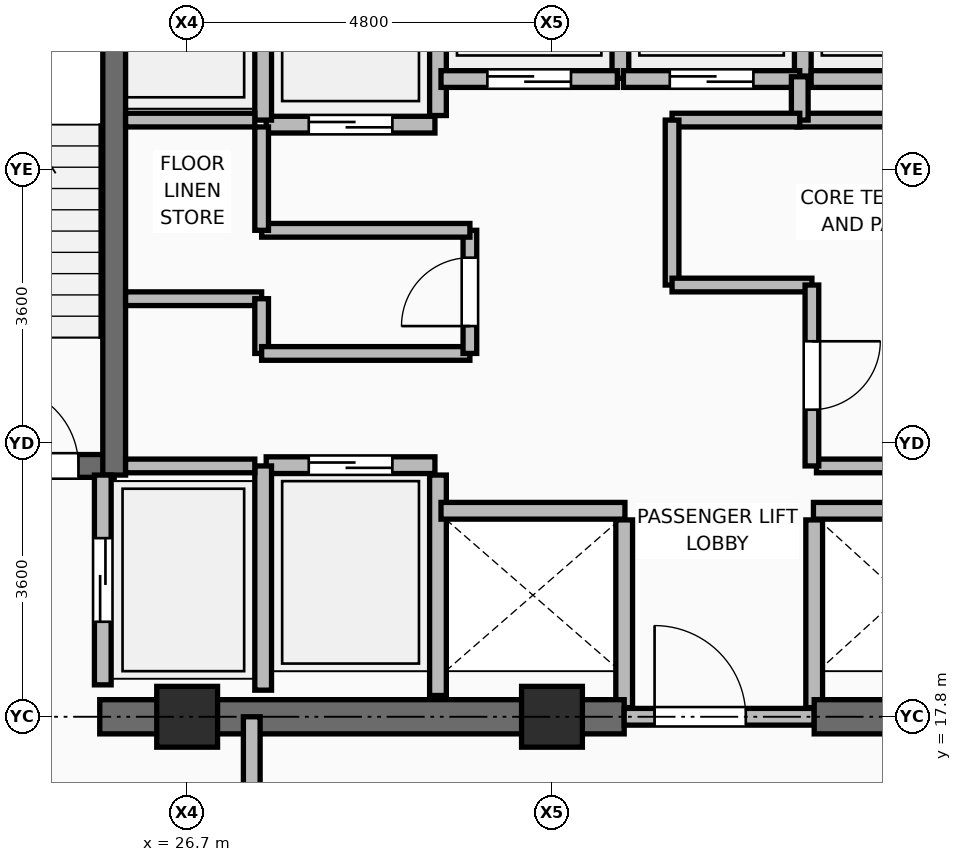
"""IFC4 building model, lengths in metres.
Left out: names, types, materials, properties, quantities, classifications, styles, units other than length and angle.
Written with IfcOpenShell. Run it as: python <this file> out.ifc"""

import sys

from ifc_helpers import new_model, si_unit, direction, frame, frame_2d, origin, origin_2d, place, context, subcontext, project, spatial, rectangle, extrude, element, fill, save


model = new_model("IFC4")
c1 = context("Model", 3, precision=1e-05, world=origin(), true_north=direction((0.0, 1.0)))
c2 = subcontext(c1, "Body", "Model", "MODEL_VIEW")
j1 = project(units=[si_unit("LENGTHUNIT", "METRE"), si_unit("PLANEANGLEUNIT", "RADIAN")], contexts=[c1])
p1 = place(None, origin())
s1 = spatial("IfcSite", under=j1, at=p1, CompositionType="ELEMENT")
p2 = place(p1, origin())
s2 = spatial("IfcBuilding", under=s1, at=p2, CompositionType="ELEMENT")
p3 = place(p2, frame((0.0, 0.0, 216.15)))
s3 = spatial("IfcBuildingStorey", under=s2, at=p3, CompositionType="ELEMENT", Elevation=216.15)
for number, where, z_axis, x_axis in (
    (1, (26.7, 17.8, 0.0), (0.0, 0.0, 1.0), (1.0, 0.0, 0.0)),
    (2, (31.5, 17.8, 0.0), (0.0, 0.0, 1.0), (1.0, 0.0, 0.0)),
):
    element("IfcColumn", number, at=place(p3, frame(where, z_axis=z_axis, x_axis=x_axis)), inside=s3, PredefinedType="COLUMN", context=c2, shape_type="SweptSolid", body=[
        extrude(rectangle(XDim=0.8, YDim=0.8, at=origin_2d()), origin(), (0.0, 0.0, 1.0), 3.75),
    ])
p4 = place(p3, frame((30.0, 18.08, 0.0), z_axis=(0.0, 0.0, 1.0), x_axis=(0.0, 1.0, 0.0)))
e3 = element("IfcWall", 3, at=p4, inside=s3, PredefinedType="PARTITIONING", context=c2, shape_type="SweptSolid", body=[
    extrude(rectangle(XDim=2.9, YDim=0.22, at=frame_2d((1.45, 0.0))), origin(), (0.0, 0.0, 1.0), 3.545),
])
for number, where, z_axis, x_axis in (
    (4, (32.45, 17.92, 0.0), (0.0, 0.0, 1.0), (0.0, 1.0, 0.0)),
    (5, (34.95, 17.92, 0.0), (0.0, 0.0, 1.0), (0.0, 1.0, 0.0)),
):
    element("IfcWall", number, at=place(p3, frame(where, z_axis=z_axis, x_axis=x_axis)), inside=s3, PredefinedType="PARTITIONING", context=c2, shape_type="SweptSolid", body=[
        extrude(rectangle(XDim=2.47, YDim=0.22, at=frame_2d((1.235, 0.0))), origin(), (0.0, 0.0, 1.0), 3.545),
    ])
p5 = place(p3, frame((30.0, 25.71, 0.0), z_axis=(0.0, 0.0, 1.0), x_axis=(0.0, 1.0, 0.0)))
e6 = element("IfcWall", 6, at=p5, inside=s3, PredefinedType="PARTITIONING", context=c2, shape_type="SweptSolid", body=[
    extrude(rectangle(XDim=2.73, YDim=0.22, at=frame_2d((1.365, 0.0))), origin(), (0.0, 0.0, 1.0), 3.545),
])
p6 = place(p3, frame((32.4, 26.2, 0.0), z_axis=(0.0, 0.0, 1.0), x_axis=(0.0, 1.0, 0.0)))
e7 = element("IfcWall", 7, at=p6, inside=s3, PredefinedType="PARTITIONING", context=c2, shape_type="SweptSolid", body=[
    extrude(rectangle(XDim=2.24, YDim=0.22, at=frame_2d((1.12, 0.0))), origin(), (0.0, 0.0, 1.0), 3.545),
])
p7 = place(p3, frame((34.8, 26.23, 0.0), z_axis=(0.0, 0.0, 1.0), x_axis=(0.0, 1.0, 0.0)))
e8 = element("IfcWall", 8, at=p7, inside=s3, PredefinedType="PARTITIONING", context=c2, shape_type="SweptSolid", body=[
    extrude(rectangle(XDim=2.21, YDim=0.22, at=frame_2d((1.105, 0.0))), origin(), (0.0, 0.0, 1.0), 3.545),
])
p8 = place(p3, frame((34.91, 26.19, 0.0), z_axis=(0.0, 0.0, 1.0), x_axis=(1.0, 0.0, 0.0)))
e9 = element("IfcWall", 9, at=p8, inside=s3, PredefinedType="PARTITIONING", context=c2, shape_type="SweptSolid", body=[
    extrude(rectangle(XDim=2.14, YDim=0.22, at=frame_2d((1.07, 0.0))), origin(), (0.0, 0.0, 1.0), 3.545),
])
p9 = place(p3, frame((25.55, 17.8, 0.0), z_axis=(0.0, 0.0, 1.0), x_axis=(1.0, 0.0, 0.0)))
e10 = element("IfcWall", 10, at=p9, inside=s3, PredefinedType="SHEAR", context=c2, shape_type="SweptSolid", body=[
    extrude(rectangle(XDim=6.9, YDim=0.45, at=frame_2d((3.45, 0.0))), origin(), (0.0, 0.0, 1.0), 3.57),
])
p10 = place(p3, frame((32.45, 17.8, 0.0), z_axis=(0.0, 0.0, 1.0), x_axis=(1.0, 0.0, 0.0)))
e11 = element("IfcWall", 11, at=p10, inside=s3, PredefinedType="PARTITIONING", context=c2, shape_type="SweptSolid", body=[
    extrude(rectangle(XDim=2.5, YDim=0.22, at=frame_2d((1.25, 0.0))), origin(), (0.0, 0.0, 1.0), 3.081),
])
p11 = place(p10, frame((0.4, 0.0, 0.0)))
e12 = element("IfcOpeningElement", 12, at=p11, cuts=e11, PredefinedType="OPENING", context=c2, shape_type="SweptSolid", body=[
    extrude(rectangle(XDim=1.2, YDim=2.1, at=frame_2d((0.6, 1.05))), frame((0.0, 0.12, 0.0), z_axis=(0.0, -1.0, 0.0), x_axis=(1.0, 0.0, 0.0)), (0.0, 0.0, 1.0), 0.24),
])
p12 = place(p3, frame((34.95, 17.8, 0.0), z_axis=(0.0, 0.0, 1.0), x_axis=(1.0, 0.0, 0.0)))
e13 = element("IfcWall", 13, at=p12, inside=s3, PredefinedType="SHEAR", context=c2, shape_type="SweptSolid", body=[
    extrude(rectangle(XDim=6.375, YDim=0.45, at=frame_2d((3.188, 0.0))), origin(), (0.0, 0.0, 1.0), 3.57),
])
p13 = place(p3, frame((22.125, 21.1, 0.0), z_axis=(0.0, 0.0, 1.0), x_axis=(1.0, 0.0, 0.0)))
e14 = element("IfcWall", 14, at=p13, inside=s3, PredefinedType="SHEAR", context=c2, shape_type="SweptSolid", body=[
    extrude(rectangle(XDim=3.615, YDim=0.3, at=frame_2d((1.808, 0.0))), origin(), (0.0, 0.0, 1.0), 3.57),
])
p14 = place(p13, frame((2.095, 0.0, 0.0)))
e15 = element("IfcOpeningElement", 15, at=p14, cuts=e14, PredefinedType="OPENING", context=c2, shape_type="SweptSolid", body=[
    extrude(rectangle(XDim=1.05, YDim=2.1, at=frame_2d((0.525, 1.05))), frame((0.0, 0.16, 0.0), z_axis=(0.0, -1.0, 0.0), x_axis=(1.0, 0.0, 0.0)), (0.0, 0.0, 1.0), 0.32),
])
p15 = place(p3, frame((25.74, 20.98, 0.0), z_axis=(0.0, 0.0, 1.0), x_axis=(0.0, 1.0, 0.0)))
e16 = element("IfcWall", 16, at=p15, inside=s3, PredefinedType="SHEAR", context=c2, shape_type="SweptSolid", body=[
    extrude(rectangle(XDim=7.99, YDim=0.3, at=frame_2d((3.995, 0.0))), origin(), (0.0, 0.0, 1.0), 3.57),
])
p16 = place(p3, frame((25.59, 18.22, 0.0), z_axis=(0.0, 0.0, 1.0), x_axis=(0.0, 1.0, 0.0)))
e17 = element("IfcWall", 17, at=p16, inside=s3, PredefinedType="PARTITIONING", context=c2, shape_type="SweptSolid", body=[
    extrude(rectangle(XDim=2.76, YDim=0.22, at=frame_2d((1.38, 0.0))), origin(), (0.0, 0.0, 1.0), 3.55),
])
p17 = place(p16, frame((0.83, 0.0, 0.0)))
e18 = element("IfcOpeningElement", 18, at=p17, cuts=e17, PredefinedType="OPENING", context=c2, shape_type="SweptSolid", body=[
    extrude(rectangle(XDim=1.1, YDim=2.2, at=frame_2d((0.55, 1.1))), frame((0.0, 0.12, 0.0), z_axis=(0.0, -1.0, 0.0), x_axis=(1.0, 0.0, 0.0)), (0.0, 0.0, 1.0), 0.24),
])
p18 = place(p3, frame((27.74, 21.11, 0.0), z_axis=(0.0, 0.0, 1.0), x_axis=(1.0, 0.0, 0.0)))
e19 = element("IfcWall", 19, at=p18, inside=s3, PredefinedType="PARTITIONING", context=c2, shape_type="SweptSolid", body=[
    extrude(rectangle(XDim=2.22, YDim=0.22, at=frame_2d((1.11, 0.0))), origin(), (0.0, 0.0, 1.0), 3.55),
])
p19 = place(p18, frame((0.56, 0.0, 0.0)))
e20 = element("IfcOpeningElement", 20, at=p19, cuts=e19, PredefinedType="OPENING", context=c2, shape_type="SweptSolid", body=[
    extrude(rectangle(XDim=1.1, YDim=2.2, at=frame_2d((0.55, 1.1))), frame((0.0, 0.12, 0.0), z_axis=(0.0, -1.0, 0.0), x_axis=(1.0, 0.0, 0.0)), (0.0, 0.0, 1.0), 0.24),
])
p20 = place(p3, frame((27.74, 25.59, 0.0), z_axis=(0.0, 0.0, 1.0), x_axis=(1.0, 0.0, 0.0)))
e21 = element("IfcWall", 21, at=p20, inside=s3, PredefinedType="PARTITIONING", context=c2, shape_type="SweptSolid", body=[
    extrude(rectangle(XDim=2.22, YDim=0.22, at=frame_2d((1.11, 0.0))), origin(), (0.0, 0.0, 1.0), 3.55),
])
p21 = place(p20, frame((0.56, 0.0, 0.0)))
e22 = element("IfcOpeningElement", 22, at=p21, cuts=e21, PredefinedType="OPENING", context=c2, shape_type="SweptSolid", body=[
    extrude(rectangle(XDim=1.1, YDim=2.2, at=frame_2d((0.55, 1.1))), frame((0.0, 0.12, 0.0), z_axis=(0.0, -1.0, 0.0), x_axis=(1.0, 0.0, 0.0)), (0.0, 0.0, 1.0), 0.24),
])
p22 = place(p3, frame((30.04, 20.51, 0.0), z_axis=(0.0, 0.0, 1.0), x_axis=(1.0, 0.0, 0.0)))
e23 = element("IfcWall", 23, at=p22, inside=s3, PredefinedType="PARTITIONING", context=c2, shape_type="SweptSolid", body=[
    extrude(rectangle(XDim=2.42, YDim=0.22, at=frame_2d((1.21, 0.0))), origin(), (0.0, 0.0, 1.0), 3.55),
])
p23 = place(p3, frame((34.94, 20.51, 0.0), z_axis=(0.0, 0.0, 1.0), x_axis=(1.0, 0.0, 0.0)))
e24 = element("IfcWall", 24, at=p23, inside=s3, PredefinedType="PARTITIONING", context=c2, shape_type="SweptSolid", body=[
    extrude(rectangle(XDim=2.24, YDim=0.22, at=frame_2d((1.12, 0.0))), origin(), (0.0, 0.0, 1.0), 3.55),
])
p24 = place(p3, frame((30.04, 26.19, 0.0), z_axis=(0.0, 0.0, 1.0), x_axis=(1.0, 0.0, 0.0)))
e25 = element("IfcWall", 25, at=p24, inside=s3, PredefinedType="PARTITIONING", context=c2, shape_type="SweptSolid", body=[
    extrude(rectangle(XDim=2.32, YDim=0.22, at=frame_2d((1.16, 0.0))), origin(), (0.0, 0.0, 1.0), 3.55),
])
p25 = place(p24, frame((0.61, 0.0, 0.0)))
e26 = element("IfcOpeningElement", 26, at=p25, cuts=e25, PredefinedType="OPENING", context=c2, shape_type="SweptSolid", body=[
    extrude(rectangle(XDim=1.1, YDim=2.2, at=frame_2d((0.55, 1.1))), frame((0.0, 0.12, 0.0), z_axis=(0.0, -1.0, 0.0), x_axis=(1.0, 0.0, 0.0)), (0.0, 0.0, 1.0), 0.24),
])
p26 = place(p3, frame((32.44, 26.19, 0.0), z_axis=(0.0, 0.0, 1.0), x_axis=(1.0, 0.0, 0.0)))
e27 = element("IfcWall", 27, at=p26, inside=s3, PredefinedType="PARTITIONING", context=c2, shape_type="SweptSolid", body=[
    extrude(rectangle(XDim=2.32, YDim=0.22, at=frame_2d((1.16, 0.0))), origin(), (0.0, 0.0, 1.0), 3.55),
])
p27 = place(p26, frame((0.61, 0.0, 0.0)))
e28 = element("IfcOpeningElement", 28, at=p27, cuts=e27, PredefinedType="OPENING", context=c2, shape_type="SweptSolid", body=[
    extrude(rectangle(XDim=1.1, YDim=2.2, at=frame_2d((0.55, 1.1))), frame((0.0, 0.12, 0.0), z_axis=(0.0, -1.0, 0.0), x_axis=(1.0, 0.0, 0.0)), (0.0, 0.0, 1.0), 0.24),
])
p28 = place(p3, frame((27.7, 18.15, 0.0), z_axis=(0.0, 0.0, 1.0), x_axis=(0.0, 1.0, 0.0)))
e29 = element("IfcWall", 29, at=p28, inside=s3, PredefinedType="PARTITIONING", context=c2, shape_type="SweptSolid", body=[
    extrude(rectangle(XDim=2.95, YDim=0.22, at=frame_2d((1.475, 0.0))), origin(), (0.0, 0.0, 1.0), 3.55),
])
p29 = place(p3, frame((27.7, 25.65, 0.0), z_axis=(0.0, 0.0, 1.0), x_axis=(0.0, 1.0, 0.0)))
e30 = element("IfcWall", 30, at=p29, inside=s3, PredefinedType="PARTITIONING", context=c2, shape_type="SweptSolid", body=[
    extrude(rectangle(XDim=3.0, YDim=0.22, at=frame_2d((1.5, 0.0))), origin(), (0.0, 0.0, 1.0), 3.55),
])
for number, where, z_axis, x_axis in (
    (31, (25.89, 21.1, 0.0), (0.0, 0.0, 1.0), (1.0, 0.0, 0.0)),
    (32, (25.89, 25.65, 0.0), (0.0, 0.0, 1.0), (1.0, 0.0, 0.0)),
):
    element("IfcWall", number, at=place(p3, frame(where, z_axis=z_axis, x_axis=x_axis)), inside=s3, PredefinedType="PARTITIONING", context=c2, shape_type="SweptSolid", body=[
        extrude(rectangle(XDim=1.7, YDim=0.18, at=frame_2d((0.85, 0.0))), origin(), (0.0, 0.0, 1.0), 3.55),
    ])
p30 = place(p3, frame((25.89, 23.3, 0.0), z_axis=(0.0, 0.0, 1.0), x_axis=(1.0, 0.0, 0.0)))
e33 = element("IfcWall", 33, at=p30, inside=s3, PredefinedType="PARTITIONING", context=c2, shape_type="SweptSolid", body=[
    extrude(rectangle(XDim=1.79, YDim=0.18, at=frame_2d((0.895, 0.0))), origin(), (0.0, 0.0, 1.0), 3.55),
])
p31 = place(p3, frame((27.68, 22.58, 0.0), z_axis=(0.0, 0.0, 1.0), x_axis=(0.0, 1.0, 0.0)))
e34 = element("IfcWall", 34, at=p31, inside=s3, PredefinedType="PARTITIONING", context=c2, shape_type="SweptSolid", body=[
    extrude(rectangle(XDim=0.72, YDim=0.18, at=frame_2d((0.36, 0.0))), origin(), (0.0, 0.0, 1.0), 3.55),
])
p32 = place(p3, frame((27.68, 22.58, 0.0), z_axis=(0.0, 0.0, 1.0), x_axis=(1.0, 0.0, 0.0)))
e35 = element("IfcWall", 35, at=p32, inside=s3, PredefinedType="PARTITIONING", context=c2, shape_type="SweptSolid", body=[
    extrude(rectangle(XDim=2.74, YDim=0.18, at=frame_2d((1.37, 0.0))), origin(), (0.0, 0.0, 1.0), 3.55),
])
p33 = place(p3, frame((30.42, 22.58, 0.0), z_axis=(0.0, 0.0, 1.0), x_axis=(0.0, 1.0, 0.0)))
e36 = element("IfcWall", 36, at=p33, inside=s3, PredefinedType="PARTITIONING", context=c2, shape_type="SweptSolid", body=[
    extrude(rectangle(XDim=1.62, YDim=0.18, at=frame_2d((0.81, 0.0))), origin(), (0.0, 0.0, 1.0), 3.55),
])
p34 = place(p33, frame((0.36, 0.0, 0.0)))
e37 = element("IfcOpeningElement", 37, at=p34, cuts=e36, PredefinedType="OPENING", context=c2, shape_type="SweptSolid", body=[
    extrude(rectangle(XDim=0.9, YDim=2.1, at=frame_2d((0.45, 1.05))), frame((0.0, 0.1, 0.0), z_axis=(0.0, -1.0, 0.0), x_axis=(1.0, 0.0, 0.0)), (0.0, 0.0, 1.0), 0.2),
])
p35 = place(p3, frame((27.68, 24.2, 0.0), z_axis=(0.0, 0.0, 1.0), x_axis=(1.0, 0.0, 0.0)))
e38 = element("IfcWall", 38, at=p35, inside=s3, PredefinedType="PARTITIONING", context=c2, shape_type="SweptSolid", body=[
    extrude(rectangle(XDim=2.74, YDim=0.18, at=frame_2d((1.37, 0.0))), origin(), (0.0, 0.0, 1.0), 3.55),
])
p36 = place(p3, frame((27.68, 24.2, 0.0), z_axis=(0.0, 0.0, 1.0), x_axis=(0.0, 1.0, 0.0)))
e39 = element("IfcWall", 39, at=p36, inside=s3, PredefinedType="PARTITIONING", context=c2, shape_type="SweptSolid", body=[
    extrude(rectangle(XDim=1.36, YDim=0.18, at=frame_2d((0.68, 0.0))), origin(), (0.0, 0.0, 1.0), 3.55),
])
p37 = place(p3, frame((34.98, 21.1, 0.0), z_axis=(0.0, 0.0, 1.0), x_axis=(1.0, 0.0, 0.0)))
e40 = element("IfcWall", 40, at=p37, inside=s3, PredefinedType="PARTITIONING", context=c2, shape_type="SweptSolid", body=[
    extrude(rectangle(XDim=2.08, YDim=0.18, at=frame_2d((1.04, 0.0))), origin(), (0.0, 0.0, 1.0), 3.55),
])
p38 = place(p3, frame((34.72, 25.65, 0.0), z_axis=(0.0, 0.0, 1.0), x_axis=(1.0, 0.0, 0.0)))
e41 = element("IfcWall", 41, at=p38, inside=s3, PredefinedType="PARTITIONING", context=c2, shape_type="SweptSolid", body=[
    extrude(rectangle(XDim=2.34, YDim=0.18, at=frame_2d((1.17, 0.0))), origin(), (0.0, 0.0, 1.0), 3.55),
])
p39 = place(p3, frame((34.76, 25.65, 0.0), z_axis=(0.0, 0.0, 1.0), x_axis=(0.0, 1.0, 0.0)))
e42 = element("IfcWall", 42, at=p39, inside=s3, PredefinedType="PARTITIONING", context=c2, shape_type="SweptSolid", body=[
    extrude(rectangle(XDim=0.57, YDim=0.22, at=frame_2d((0.285, 0.0))), origin(), (0.0, 0.0, 1.0), 3.55),
])
p40 = place(p3, frame((33.08, 25.65, 0.0), z_axis=(0.0, 0.0, 1.0), x_axis=(1.0, 0.0, 0.0)))
e43 = element("IfcWall", 43, at=p40, inside=s3, PredefinedType="PARTITIONING", context=c2, shape_type="SweptSolid", body=[
    extrude(rectangle(XDim=1.68, YDim=0.18, at=frame_2d((0.84, 0.0))), origin(), (0.0, 0.0, 1.0), 3.55),
])
p41 = place(p3, frame((33.08, 23.48, 0.0), z_axis=(0.0, 0.0, 1.0), x_axis=(0.0, 1.0, 0.0)))
e44 = element("IfcWall", 44, at=p41, inside=s3, PredefinedType="PARTITIONING", context=c2, shape_type="SweptSolid", body=[
    extrude(rectangle(XDim=2.17, YDim=0.18, at=frame_2d((1.085, 0.0))), origin(), (0.0, 0.0, 1.0), 3.55),
])
p42 = place(p3, frame((33.08, 23.48, 0.0), z_axis=(0.0, 0.0, 1.0), x_axis=(1.0, 0.0, 0.0)))
e45 = element("IfcWall", 45, at=p42, inside=s3, PredefinedType="PARTITIONING", context=c2, shape_type="SweptSolid", body=[
    extrude(rectangle(XDim=1.84, YDim=0.18, at=frame_2d((0.92, 0.0))), origin(), (0.0, 0.0, 1.0), 3.55),
])
p43 = place(p3, frame((34.92, 21.1, 0.0), z_axis=(0.0, 0.0, 1.0), x_axis=(0.0, 1.0, 0.0)))
e46 = element("IfcWall", 46, at=p43, inside=s3, PredefinedType="PARTITIONING", context=c2, shape_type="SweptSolid", body=[
    extrude(rectangle(XDim=2.38, YDim=0.18, at=frame_2d((1.19, 0.0))), origin(), (0.0, 0.0, 1.0), 3.55),
])
p44 = place(p43, frame((0.74, 0.0, 0.0)))
e47 = element("IfcOpeningElement", 47, at=p44, cuts=e46, PredefinedType="OPENING", context=c2, shape_type="SweptSolid", body=[
    extrude(rectangle(XDim=0.9, YDim=2.1, at=frame_2d((0.45, 1.05))), frame((0.0, 0.1, 0.0), z_axis=(0.0, -1.0, 0.0), x_axis=(1.0, 0.0, 0.0)), (0.0, 0.0, 1.0), 0.2),
])
p45 = place(p3, frame((27.55, 14.35, 0.0), z_axis=(0.0, 0.0, 1.0), x_axis=(0.0, 1.0, 0.0)))
e48 = element("IfcWall", 48, at=p45, inside=s3, PredefinedType="PARTITIONING", context=c2, shape_type="SweptSolid", body=[
    extrude(rectangle(XDim=3.45, YDim=0.22, at=frame_2d((1.725, 0.0))), origin(), (0.0, 0.0, 1.0), 3.081),
])
p46 = place(p45, frame((1.175, 0.0, 0.0)))
e49 = element("IfcOpeningElement", 49, at=p46, cuts=e48, PredefinedType="OPENING", context=c2, shape_type="SweptSolid", body=[
    extrude(rectangle(XDim=1.1, YDim=2.1, at=frame_2d((0.55, 1.05))), frame((0.0, 0.12, 0.0), z_axis=(0.0, -1.0, 0.0), x_axis=(1.0, 0.0, 0.0)), (0.0, 0.0, 1.0), 0.24),
])
p47 = place(p11, origin())
e50 = element("IfcDoor", 50, at=p47, inside=s3, OperationType="SINGLE_SWING_LEFT", PredefinedType="DOOR", context=c2, shape_type="SweptSolid", body=[
    extrude(rectangle(XDim=1.2, YDim=2.1, at=frame_2d((0.6, 1.05))), frame((0.0, 0.025, 0.0), z_axis=(0.0, -1.0, 0.0), x_axis=(1.0, 0.0, 0.0)), (0.0, 0.0, 1.0), 0.05),
])
fill(e12, e50)
p48 = place(p14, origin())
e51 = element("IfcDoor", 51, at=p48, inside=s3, OperationType="SINGLE_SWING_LEFT", PredefinedType="DOOR", context=c2, shape_type="SweptSolid", body=[
    extrude(rectangle(XDim=1.05, YDim=2.1, at=frame_2d((0.525, 1.05))), frame((0.0, 0.025, 0.0), z_axis=(0.0, -1.0, 0.0), x_axis=(1.0, 0.0, 0.0)), (0.0, 0.0, 1.0), 0.05),
])
fill(e15, e51)
p49 = place(p17, origin())
e52 = element("IfcDoor", 52, at=p49, inside=s3, OperationType="DOUBLE_DOOR_SLIDING", PredefinedType="DOOR", context=c2, shape_type="SweptSolid", body=[
    extrude(rectangle(XDim=1.1, YDim=2.2, at=frame_2d((0.55, 1.1))), frame((0.0, 0.025, 0.0), z_axis=(0.0, -1.0, 0.0), x_axis=(1.0, 0.0, 0.0)), (0.0, 0.0, 1.0), 0.05),
])
fill(e18, e52)
p50 = place(p19, origin())
e53 = element("IfcDoor", 53, at=p50, inside=s3, OperationType="DOUBLE_DOOR_SLIDING", PredefinedType="DOOR", context=c2, shape_type="SweptSolid", body=[
    extrude(rectangle(XDim=1.1, YDim=2.2, at=frame_2d((0.55, 1.1))), frame((0.0, 0.025, 0.0), z_axis=(0.0, -1.0, 0.0), x_axis=(1.0, 0.0, 0.0)), (0.0, 0.0, 1.0), 0.05),
])
fill(e20, e53)
p51 = place(p21, frame((1.1, 0.0, 0.0), z_axis=(0.0, 0.0, 1.0), x_axis=(-1.0, 0.0, 0.0)))
e54 = element("IfcDoor", 54, at=p51, inside=s3, OperationType="DOUBLE_DOOR_SLIDING", PredefinedType="DOOR", context=c2, shape_type="SweptSolid", body=[
    extrude(rectangle(XDim=1.1, YDim=2.2, at=frame_2d((0.55, 1.1))), frame((0.0, 0.025, 0.0), z_axis=(0.0, -1.0, 0.0), x_axis=(1.0, 0.0, 0.0)), (0.0, 0.0, 1.0), 0.05),
])
fill(e22, e54)
p52 = place(p25, frame((1.1, 0.0, 0.0), z_axis=(0.0, 0.0, 1.0), x_axis=(-1.0, 0.0, 0.0)))
e55 = element("IfcDoor", 55, at=p52, inside=s3, OperationType="DOUBLE_DOOR_SLIDING", PredefinedType="DOOR", context=c2, shape_type="SweptSolid", body=[
    extrude(rectangle(XDim=1.1, YDim=2.2, at=frame_2d((0.55, 1.1))), frame((0.0, 0.025, 0.0), z_axis=(0.0, -1.0, 0.0), x_axis=(1.0, 0.0, 0.0)), (0.0, 0.0, 1.0), 0.05),
])
fill(e26, e55)
p53 = place(p27, frame((1.1, 0.0, 0.0), z_axis=(0.0, 0.0, 1.0), x_axis=(-1.0, 0.0, 0.0)))
e56 = element("IfcDoor", 56, at=p53, inside=s3, OperationType="DOUBLE_DOOR_SLIDING", PredefinedType="DOOR", context=c2, shape_type="SweptSolid", body=[
    extrude(rectangle(XDim=1.1, YDim=2.2, at=frame_2d((0.55, 1.1))), frame((0.0, 0.025, 0.0), z_axis=(0.0, -1.0, 0.0), x_axis=(1.0, 0.0, 0.0)), (0.0, 0.0, 1.0), 0.05),
])
fill(e28, e56)
p54 = place(p34, origin())
e57 = element("IfcDoor", 57, at=p54, inside=s3, OperationType="SINGLE_SWING_LEFT", PredefinedType="DOOR", context=c2, shape_type="SweptSolid", body=[
    extrude(rectangle(XDim=0.9, YDim=2.1, at=frame_2d((0.45, 1.05))), frame((0.0, 0.025, 0.0), z_axis=(0.0, -1.0, 0.0), x_axis=(1.0, 0.0, 0.0)), (0.0, 0.0, 1.0), 0.05),
])
fill(e37, e57)
p55 = place(p44, frame((0.9, 0.0, 0.0), z_axis=(0.0, 0.0, 1.0), x_axis=(-1.0, 0.0, 0.0)))
e58 = element("IfcDoor", 58, at=p55, inside=s3, OperationType="SINGLE_SWING_LEFT", PredefinedType="DOOR", context=c2, shape_type="SweptSolid", body=[
    extrude(rectangle(XDim=0.9, YDim=2.1, at=frame_2d((0.45, 1.05))), frame((0.0, 0.025, 0.0), z_axis=(0.0, -1.0, 0.0), x_axis=(1.0, 0.0, 0.0)), (0.0, 0.0, 1.0), 0.05),
])
fill(e47, e58)
save(model, sys.argv[1])
